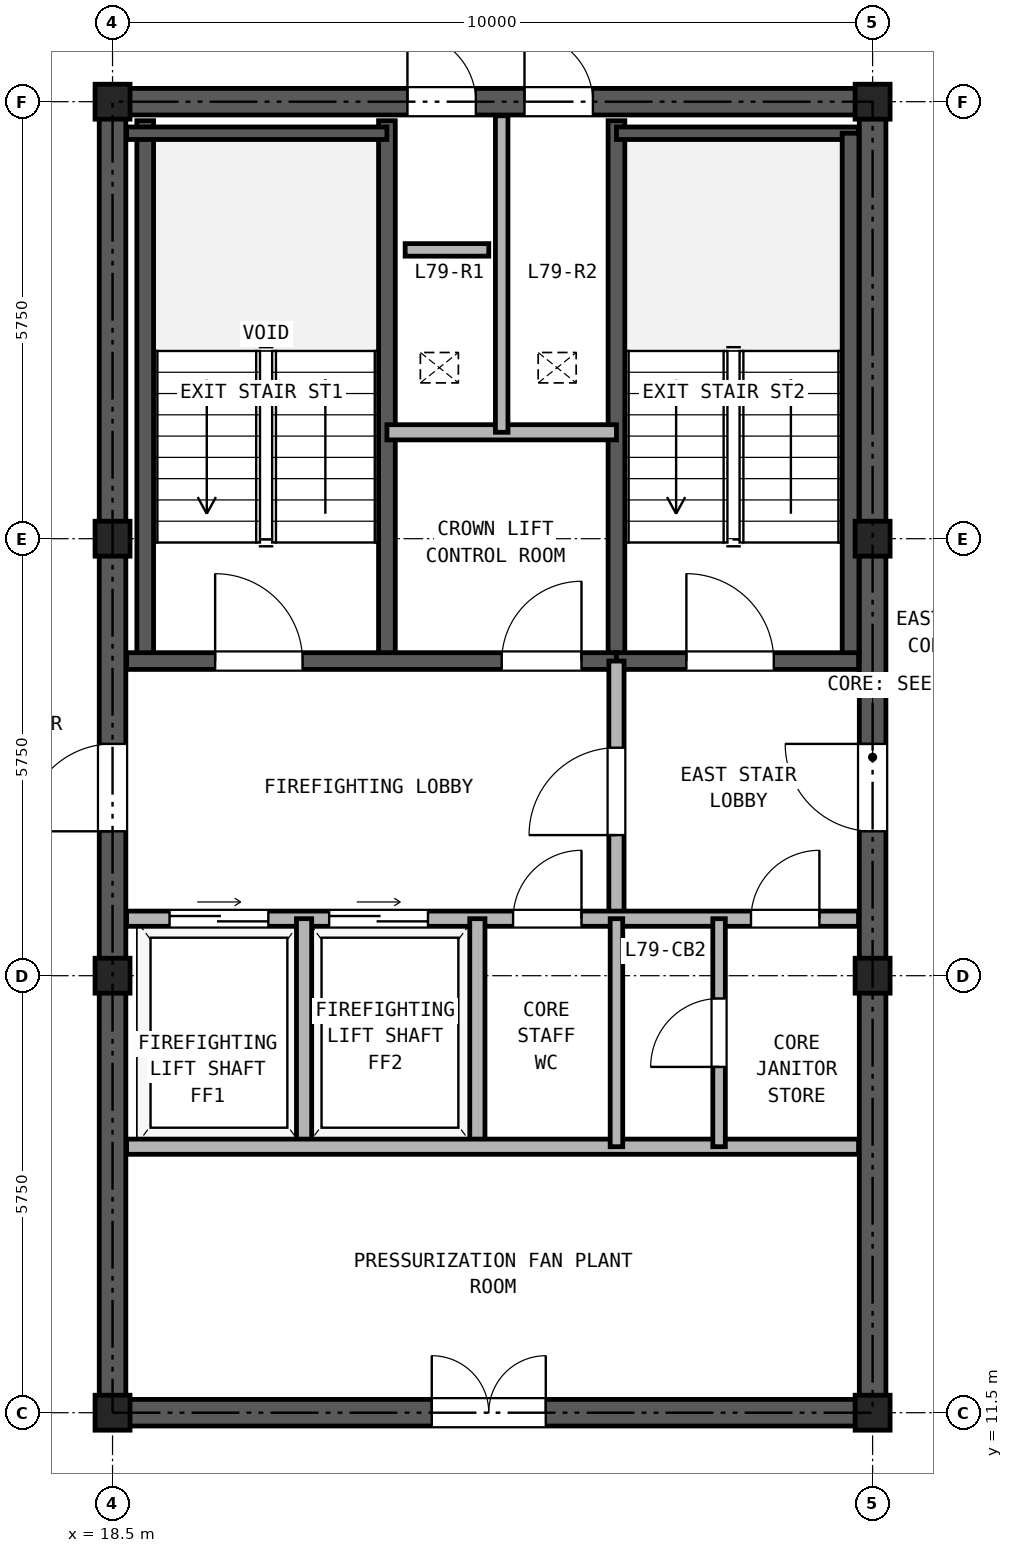
"""IFC4 building model, lengths in metres.
Left out: names, types, materials, properties, quantities, classifications, styles, units other than length and angle.
Written with IfcOpenShell. Run it as: python <this file> out.ifc"""

import sys

from ifc_helpers import new_model, si_unit, direction, frame, frame_2d, origin, origin_2d, place, context, subcontext, project, spatial, rectangle, hollow_rectangle, extrude, source, transform, mapped, element, fill, save


model = new_model("IFC4")
c1 = context("Model", 3, precision=1e-05, world=origin(), true_north=direction((0.0, 1.0)))
c2 = subcontext(c1, "Body", "Model", "MODEL_VIEW")
j1 = project(units=[si_unit("LENGTHUNIT", "METRE"), si_unit("PLANEANGLEUNIT", "RADIAN")], contexts=[c1])
p1 = place(None, origin())
s1 = spatial("IfcSite", under=j1, at=p1, CompositionType="ELEMENT")
p2 = place(p1, origin())
s2 = spatial("IfcBuilding", under=s1, at=p2, CompositionType="ELEMENT")
p3 = place(p2, frame((0.0, 0.0, 274.9)))
s3 = spatial("IfcBuildingStorey", under=s2, at=p3, CompositionType="ELEMENT", Elevation=274.9)
m1 = source(origin(), c2, "Body", "SweptSolid", [
    extrude(hollow_rectangle(XDim=0.46, YDim=0.46, WallThickness=0.025, at=origin_2d()), origin(), (0.0, 0.0, 1.0), 3.38),
])
for number, where, z_axis, x_axis in (
    (1, (18.5, 11.5, 0.0), (0.0, 0.0, 1.0), (1.0, 0.0, 0.0)),
    (2, (18.5, 17.25, 0.0), (0.0, 0.0, 1.0), (1.0, 0.0, 0.0)),
    (3, (18.5, 23.0, 0.0), (0.0, 0.0, 1.0), (1.0, 0.0, 0.0)),
    (4, (18.5, 28.75, 0.0), (0.0, 0.0, 1.0), (1.0, 0.0, 0.0)),
    (5, (28.5, 11.5, 0.0), (0.0, 0.0, 1.0), (1.0, 0.0, 0.0)),
    (6, (28.5, 17.25, 0.0), (0.0, 0.0, 1.0), (1.0, 0.0, 0.0)),
    (7, (28.5, 23.0, 0.0), (0.0, 0.0, 1.0), (1.0, 0.0, 0.0)),
    (8, (28.5, 28.75, 0.0), (0.0, 0.0, 1.0), (1.0, 0.0, 0.0)),
):
    element("IfcColumn", number, at=place(p3, frame(where, z_axis=z_axis, x_axis=x_axis)), inside=s3, PredefinedType="COLUMN", context=c2, shape_type="MappedRepresentation", body=[
        mapped(m1, transform((0.0, 0.0, 0.0), x_axis=(1.0, 0.0, 0.0), y_axis=(0.0, 1.0, 0.0), z_axis=(0.0, 0.0, 1.0), scale=1.0)),
    ])
p4 = place(p3, frame((18.325, 11.5, 0.0), z_axis=(0.0, 0.0, 1.0), x_axis=(1.0, 0.0, 0.0)))
e9 = element("IfcWall", 9, at=p4, inside=s3, PredefinedType="SHEAR", context=c2, shape_type="SweptSolid", body=[
    extrude(rectangle(XDim=10.35, YDim=0.35, at=frame_2d((5.175, 0.0))), origin(), (0.0, 0.0, 1.0), 3.38),
])
p5 = place(p4, frame((4.375, 0.0, 0.0)))
e10 = element("IfcOpeningElement", 10, at=p5, cuts=e9, PredefinedType="OPENING", context=c2, shape_type="SweptSolid", body=[
    extrude(rectangle(XDim=1.5, YDim=2.25, at=frame_2d((0.75, 1.125))), frame((0.0, 0.185, 0.0), z_axis=(0.0, -1.0, 0.0), x_axis=(1.0, 0.0, 0.0)), (0.0, 0.0, 1.0), 0.37),
])
p6 = place(p3, frame((18.325, 28.75, 0.0), z_axis=(0.0, 0.0, 1.0), x_axis=(1.0, 0.0, 0.0)))
e11 = element("IfcWall", 11, at=p6, inside=s3, PredefinedType="SHEAR", context=c2, shape_type="SweptSolid", body=[
    extrude(rectangle(XDim=10.35, YDim=0.35, at=frame_2d((5.175, 0.0))), origin(), (0.0, 0.0, 1.0), 3.38),
])
p7 = place(p6, frame((4.055, 0.0, 0.0)))
e12 = element("IfcOpeningElement", 12, at=p7, cuts=e11, PredefinedType="OPENING", context=c2, shape_type="SweptSolid", body=[
    extrude(rectangle(XDim=0.9, YDim=2.05, at=frame_2d((0.45, 1.025))), frame((0.0, 0.185, 0.0), z_axis=(0.0, -1.0, 0.0), x_axis=(1.0, 0.0, 0.0)), (0.0, 0.0, 1.0), 0.37),
])
p8 = place(p6, frame((5.595, 0.0, 0.0)))
e13 = element("IfcOpeningElement", 13, at=p8, cuts=e11, PredefinedType="OPENING", context=c2, shape_type="SweptSolid", body=[
    extrude(rectangle(XDim=0.9, YDim=2.05, at=frame_2d((0.45, 1.025))), frame((0.0, 0.185, 0.0), z_axis=(0.0, -1.0, 0.0), x_axis=(1.0, 0.0, 0.0)), (0.0, 0.0, 1.0), 0.37),
])
p9 = place(p3, frame((18.5, 11.675, 0.0), z_axis=(0.0, 0.0, 1.0), x_axis=(0.0, 1.0, 0.0)))
e14 = element("IfcWall", 14, at=p9, inside=s3, PredefinedType="SHEAR", context=c2, shape_type="SweptSolid", body=[
    extrude(rectangle(XDim=16.9, YDim=0.35, at=frame_2d((8.45, 0.0))), origin(), (0.0, 0.0, 1.0), 3.38),
])
p10 = place(p9, frame((7.475, 0.0, 0.0)))
e15 = element("IfcOpeningElement", 15, at=p10, cuts=e14, PredefinedType="OPENING", context=c2, shape_type="SweptSolid", body=[
    extrude(rectangle(XDim=1.15, YDim=2.2, at=frame_2d((0.575, 1.1))), frame((0.0, 0.185, 0.0), z_axis=(0.0, -1.0, 0.0), x_axis=(1.0, 0.0, 0.0)), (0.0, 0.0, 1.0), 0.37),
])
p11 = place(p3, frame((28.5, 11.675, 0.0), z_axis=(0.0, 0.0, 1.0), x_axis=(0.0, 1.0, 0.0)))
e16 = element("IfcWall", 16, at=p11, inside=s3, PredefinedType="SHEAR", context=c2, shape_type="SweptSolid", body=[
    extrude(rectangle(XDim=16.9, YDim=0.35, at=frame_2d((8.45, 0.0))), origin(), (0.0, 0.0, 1.0), 3.38),
])
p12 = place(p11, frame((7.475, 0.0, 0.0)))
e17 = element("IfcOpeningElement", 17, at=p12, cuts=e16, PredefinedType="OPENING", context=c2, shape_type="SweptSolid", body=[
    extrude(rectangle(XDim=1.15, YDim=2.2, at=frame_2d((0.575, 1.1))), frame((0.0, 0.185, 0.0), z_axis=(0.0, -1.0, 0.0), x_axis=(1.0, 0.0, 0.0)), (0.0, 0.0, 1.0), 0.37),
])
for number, where, z_axis, x_axis in (
    (18, (18.93, 21.39, 0.0), (0.0, 0.0, 1.0), (0.0, 1.0, 0.0)),
    (19, (22.11, 21.39, 0.0), (0.0, 0.0, 1.0), (0.0, 1.0, 0.0)),
    (20, (25.13, 21.39, 0.0), (0.0, 0.0, 1.0), (0.0, 1.0, 0.0)),
):
    element("IfcWall", number, at=place(p3, frame(where, z_axis=z_axis, x_axis=x_axis)), inside=s3, PredefinedType="SOLIDWALL", context=c2, shape_type="SweptSolid", body=[
        extrude(rectangle(XDim=7.11, YDim=0.22, at=frame_2d((3.555, 0.0))), origin(), (0.0, 0.0, 1.0), 3.38),
    ])
p13 = place(p3, frame((18.685, 28.335, 0.0), z_axis=(0.0, 0.0, 1.0), x_axis=(1.0, 0.0, 0.0)))
e21 = element("IfcWall", 21, at=p13, inside=s3, PredefinedType="PARTITIONING", context=c2, shape_type="SweptSolid", body=[
    extrude(rectangle(XDim=3.425, YDim=0.165, at=frame_2d((1.712, 0.0))), origin(), (0.0, 0.0, 1.0), 3.38),
])
p14 = place(p3, frame((25.13, 28.335, 0.0), z_axis=(0.0, 0.0, 1.0), x_axis=(1.0, 0.0, 0.0)))
e22 = element("IfcWall", 22, at=p14, inside=s3, PredefinedType="PARTITIONING", context=c2, shape_type="SweptSolid", body=[
    extrude(rectangle(XDim=3.185, YDim=0.165, at=frame_2d((1.593, 0.0))), origin(), (0.0, 0.0, 1.0), 3.38),
])
p15 = place(p3, frame((28.21, 21.39, 0.0), z_axis=(0.0, 0.0, 1.0), x_axis=(0.0, 1.0, 0.0)))
e23 = element("IfcWall", 23, at=p15, inside=s3, PredefinedType="SOLIDWALL", context=c2, shape_type="SweptSolid", body=[
    extrude(rectangle(XDim=6.945, YDim=0.22, at=frame_2d((3.473, 0.0))), origin(), (0.0, 0.0, 1.0), 3.38),
])
p16 = place(p3, frame((18.685, 21.39, 0.0), z_axis=(0.0, 0.0, 1.0), x_axis=(1.0, 0.0, 0.0)))
e24 = element("IfcWall", 24, at=p16, inside=s3, PredefinedType="SOLIDWALL", context=c2, shape_type="SweptSolid", body=[
    extrude(rectangle(XDim=6.445, YDim=0.22, at=frame_2d((3.222, 0.0))), origin(), (0.0, 0.0, 1.0), 3.38),
])
p17 = place(p16, frame((1.165, 0.0, 0.0)))
e25 = element("IfcOpeningElement", 25, at=p17, cuts=e24, PredefinedType="OPENING", context=c2, shape_type="SweptSolid", body=[
    extrude(rectangle(XDim=1.15, YDim=2.2, at=frame_2d((0.575, 1.1))), frame((0.0, 0.12, 0.0), z_axis=(0.0, -1.0, 0.0), x_axis=(1.0, 0.0, 0.0)), (0.0, 0.0, 1.0), 0.24),
])
p18 = place(p16, frame((4.935, 0.0, 0.0)))
e26 = element("IfcOpeningElement", 26, at=p18, cuts=e24, PredefinedType="OPENING", context=c2, shape_type="SweptSolid", body=[
    extrude(rectangle(XDim=1.05, YDim=2.15, at=frame_2d((0.525, 1.075))), frame((0.0, 0.12, 0.0), z_axis=(0.0, -1.0, 0.0), x_axis=(1.0, 0.0, 0.0)), (0.0, 0.0, 1.0), 0.24),
])
p19 = place(p3, frame((25.13, 21.39, 0.0), z_axis=(0.0, 0.0, 1.0), x_axis=(1.0, 0.0, 0.0)))
e27 = element("IfcWall", 27, at=p19, inside=s3, PredefinedType="SOLIDWALL", context=c2, shape_type="SweptSolid", body=[
    extrude(rectangle(XDim=3.185, YDim=0.22, at=frame_2d((1.593, 0.0))), origin(), (0.0, 0.0, 1.0), 3.38),
])
p20 = place(p19, frame((0.92, 0.0, 0.0)))
e28 = element("IfcOpeningElement", 28, at=p20, cuts=e27, PredefinedType="OPENING", context=c2, shape_type="SweptSolid", body=[
    extrude(rectangle(XDim=1.15, YDim=2.2, at=frame_2d((0.575, 1.1))), frame((0.0, 0.12, 0.0), z_axis=(0.0, -1.0, 0.0), x_axis=(1.0, 0.0, 0.0)), (0.0, 0.0, 1.0), 0.24),
])
p21 = place(p3, frame((22.11, 24.4, 0.0), z_axis=(0.0, 0.0, 1.0), x_axis=(1.0, 0.0, 0.0)))
e29 = element("IfcWall", 29, at=p21, inside=s3, PredefinedType="PARTITIONING", context=c2, shape_type="SweptSolid", body=[
    extrude(rectangle(XDim=3.02, YDim=0.2, at=frame_2d((1.51, 0.0))), origin(), (0.0, 0.0, 1.0), 3.38),
])
p22 = place(p3, frame((23.62, 24.4, 0.0), z_axis=(0.0, 0.0, 1.0), x_axis=(0.0, 1.0, 0.0)))
e30 = element("IfcWall", 30, at=p22, inside=s3, PredefinedType="PARTITIONING", context=c2, shape_type="SweptSolid", body=[
    extrude(rectangle(XDim=4.165, YDim=0.165, at=frame_2d((2.083, 0.0))), origin(), (0.0, 0.0, 1.0), 3.38),
])
p23 = place(p3, frame((25.13, 18.0, 0.0), z_axis=(0.0, 0.0, 1.0), x_axis=(0.0, 1.0, 0.0)))
e31 = element("IfcWall", 31, at=p23, inside=s3, PredefinedType="PARTITIONING", context=c2, shape_type="SweptSolid", body=[
    extrude(rectangle(XDim=3.39, YDim=0.2, at=frame_2d((1.695, 0.0))), origin(), (0.0, 0.0, 1.0), 3.38),
])
p24 = place(p23, frame((1.1, 0.0, 0.0)))
e32 = element("IfcOpeningElement", 32, at=p24, cuts=e31, PredefinedType="OPENING", context=c2, shape_type="SweptSolid", body=[
    extrude(rectangle(XDim=1.15, YDim=2.2, at=frame_2d((0.575, 1.1))), frame((0.0, 0.11, 0.0), z_axis=(0.0, -1.0, 0.0), x_axis=(1.0, 0.0, 0.0)), (0.0, 0.0, 1.0), 0.22),
])
p25 = place(p3, frame((18.685, 18.0, 0.0), z_axis=(0.0, 0.0, 1.0), x_axis=(1.0, 0.0, 0.0)))
e33 = element("IfcWall", 33, at=p25, inside=s3, PredefinedType="PARTITIONING", context=c2, shape_type="SweptSolid", body=[
    extrude(rectangle(XDim=9.63, YDim=0.2, at=frame_2d((4.815, 0.0))), origin(), (0.0, 0.0, 1.0), 3.38),
])
p26 = place(p25, frame((0.565, 0.0, 0.0)))
e34 = element("IfcOpeningElement", 34, at=p26, cuts=e33, PredefinedType="OPENING", context=c2, shape_type="SweptSolid", body=[
    extrude(rectangle(XDim=1.3, YDim=2.3, at=frame_2d((0.65, 1.15))), frame((0.0, 0.11, 0.0), z_axis=(0.0, -1.0, 0.0), x_axis=(1.0, 0.0, 0.0)), (0.0, 0.0, 1.0), 0.22),
])
p27 = place(p25, frame((2.665, 0.0, 0.0)))
e35 = element("IfcOpeningElement", 35, at=p27, cuts=e33, PredefinedType="OPENING", context=c2, shape_type="SweptSolid", body=[
    extrude(rectangle(XDim=1.3, YDim=2.3, at=frame_2d((0.65, 1.15))), frame((0.0, 0.11, 0.0), z_axis=(0.0, -1.0, 0.0), x_axis=(1.0, 0.0, 0.0)), (0.0, 0.0, 1.0), 0.22),
])
p28 = place(p25, frame((5.085, 0.0, 0.0)))
e36 = element("IfcOpeningElement", 36, at=p28, cuts=e33, PredefinedType="OPENING", context=c2, shape_type="SweptSolid", body=[
    extrude(rectangle(XDim=0.9, YDim=2.05, at=frame_2d((0.45, 1.025))), frame((0.0, 0.11, 0.0), z_axis=(0.0, -1.0, 0.0), x_axis=(1.0, 0.0, 0.0)), (0.0, 0.0, 1.0), 0.22),
])
p29 = place(p25, frame((8.215, 0.0, 0.0)))
e37 = element("IfcOpeningElement", 37, at=p29, cuts=e33, PredefinedType="OPENING", context=c2, shape_type="SweptSolid", body=[
    extrude(rectangle(XDim=0.9, YDim=2.05, at=frame_2d((0.45, 1.025))), frame((0.0, 0.11, 0.0), z_axis=(0.0, -1.0, 0.0), x_axis=(1.0, 0.0, 0.0)), (0.0, 0.0, 1.0), 0.22),
])
for number, where, z_axis, x_axis in (
    (38, (21.02, 15.0, 0.0), (0.0, 0.0, 1.0), (0.0, 1.0, 0.0)),
    (39, (23.3, 15.0, 0.0), (0.0, 0.0, 1.0), (0.0, 1.0, 0.0)),
):
    element("IfcWall", number, at=place(p3, frame(where, z_axis=z_axis, x_axis=x_axis)), inside=s3, PredefinedType="PARTITIONING", context=c2, shape_type="SweptSolid", body=[
        extrude(rectangle(XDim=3.0, YDim=0.2, at=frame_2d((1.5, 0.0))), origin(), (0.0, 0.0, 1.0), 3.38),
    ])
p30 = place(p3, frame((18.685, 15.0, 0.0), z_axis=(0.0, 0.0, 1.0), x_axis=(1.0, 0.0, 0.0)))
e40 = element("IfcWall", 40, at=p30, inside=s3, PredefinedType="PARTITIONING", context=c2, shape_type="SweptSolid", body=[
    extrude(rectangle(XDim=9.63, YDim=0.2, at=frame_2d((4.815, 0.0))), origin(), (0.0, 0.0, 1.0), 3.38),
])
p31 = place(p3, frame((25.13, 15.0, 0.0), z_axis=(0.0, 0.0, 1.0), x_axis=(0.0, 1.0, 0.0)))
e41 = element("IfcWall", 41, at=p31, inside=s3, PredefinedType="PARTITIONING", context=c2, shape_type="SweptSolid", body=[
    extrude(rectangle(XDim=3.0, YDim=0.165, at=frame_2d((1.5, 0.0))), origin(), (0.0, 0.0, 1.0), 3.38),
])
p32 = place(p3, frame((26.48, 15.0, 0.0), z_axis=(0.0, 0.0, 1.0), x_axis=(0.0, 1.0, 0.0)))
e42 = element("IfcWall", 42, at=p32, inside=s3, PredefinedType="PARTITIONING", context=c2, shape_type="SweptSolid", body=[
    extrude(rectangle(XDim=3.0, YDim=0.165, at=frame_2d((1.5, 0.0))), origin(), (0.0, 0.0, 1.0), 3.38),
])
p33 = place(p32, frame((1.05, 0.0, 0.0)))
e43 = element("IfcOpeningElement", 43, at=p33, cuts=e42, PredefinedType="OPENING", context=c2, shape_type="SweptSolid", body=[
    extrude(rectangle(XDim=0.9, YDim=2.05, at=frame_2d((0.45, 1.025))), frame((0.0, 0.093, 0.0), z_axis=(0.0, -1.0, 0.0), x_axis=(1.0, 0.0, 0.0)), (0.0, 0.0, 1.0), 0.185),
])
p34 = place(p3, frame((22.35, 26.8, 0.0), z_axis=(0.0, 0.0, 1.0), x_axis=(1.0, 0.0, 0.0)))
e44 = element("IfcWall", 44, at=p34, inside=s3, PredefinedType="PARTITIONING", context=c2, shape_type="SweptSolid", body=[
    extrude(rectangle(XDim=1.1, YDim=0.165, at=frame_2d((0.55, 0.0))), origin(), (0.0, 0.0, 1.0), 3.38),
])
p35 = place(p17, frame((1.15, 0.0, 0.0), z_axis=(0.0, 0.0, 1.0), x_axis=(-1.0, 0.0, 0.0)))
e45 = element("IfcDoor", 45, at=p35, inside=s3, OperationType="SINGLE_SWING_LEFT", PredefinedType="DOOR", context=c2, shape_type="SweptSolid", body=[
    extrude(rectangle(XDim=1.15, YDim=2.2, at=frame_2d((0.575, 1.1))), frame((0.0, 0.025, 0.0), z_axis=(0.0, -1.0, 0.0), x_axis=(1.0, 0.0, 0.0)), (0.0, 0.0, 1.0), 0.05),
])
fill(e25, e45)
p36 = place(p20, frame((1.15, 0.0, 0.0), z_axis=(0.0, 0.0, 1.0), x_axis=(-1.0, 0.0, 0.0)))
e46 = element("IfcDoor", 46, at=p36, inside=s3, OperationType="SINGLE_SWING_LEFT", PredefinedType="DOOR", context=c2, shape_type="SweptSolid", body=[
    extrude(rectangle(XDim=1.15, YDim=2.2, at=frame_2d((0.575, 1.1))), frame((0.0, 0.025, 0.0), z_axis=(0.0, -1.0, 0.0), x_axis=(1.0, 0.0, 0.0)), (0.0, 0.0, 1.0), 0.05),
])
fill(e28, e46)
p37 = place(p18, origin())
e47 = element("IfcDoor", 47, at=p37, inside=s3, OperationType="SINGLE_SWING_RIGHT", PredefinedType="DOOR", context=c2, shape_type="SweptSolid", body=[
    extrude(rectangle(XDim=1.05, YDim=2.15, at=frame_2d((0.525, 1.075))), frame((0.0, 0.025, 0.0), z_axis=(0.0, -1.0, 0.0), x_axis=(1.0, 0.0, 0.0)), (0.0, 0.0, 1.0), 0.05),
])
fill(e26, e47)
p38 = place(p24, origin())
e48 = element("IfcDoor", 48, at=p38, inside=s3, OperationType="SINGLE_SWING_LEFT", PredefinedType="DOOR", context=c2, shape_type="SweptSolid", body=[
    extrude(rectangle(XDim=1.15, YDim=2.2, at=frame_2d((0.575, 1.1))), frame((0.0, 0.025, 0.0), z_axis=(0.0, -1.0, 0.0), x_axis=(1.0, 0.0, 0.0)), (0.0, 0.0, 1.0), 0.05),
])
fill(e32, e48)
p39 = place(p26, origin())
e49 = element("IfcDoor", 49, at=p39, inside=s3, OperationType="DOUBLE_DOOR_SLIDING", PredefinedType="DOOR", context=c2, shape_type="SweptSolid", body=[
    extrude(rectangle(XDim=1.3, YDim=2.3, at=frame_2d((0.65, 1.15))), frame((0.0, 0.025, 0.0), z_axis=(0.0, -1.0, 0.0), x_axis=(1.0, 0.0, 0.0)), (0.0, 0.0, 1.0), 0.05),
])
fill(e34, e49)
p40 = place(p27, origin())
e50 = element("IfcDoor", 50, at=p40, inside=s3, OperationType="DOUBLE_DOOR_SLIDING", PredefinedType="DOOR", context=c2, shape_type="SweptSolid", body=[
    extrude(rectangle(XDim=1.3, YDim=2.3, at=frame_2d((0.65, 1.15))), frame((0.0, 0.025, 0.0), z_axis=(0.0, -1.0, 0.0), x_axis=(1.0, 0.0, 0.0)), (0.0, 0.0, 1.0), 0.05),
])
fill(e35, e50)
p41 = place(p28, frame((0.9, 0.0, 0.0), z_axis=(0.0, 0.0, 1.0), x_axis=(-1.0, 0.0, 0.0)))
e51 = element("IfcDoor", 51, at=p41, inside=s3, OperationType="SINGLE_SWING_RIGHT", PredefinedType="DOOR", context=c2, shape_type="SweptSolid", body=[
    extrude(rectangle(XDim=0.9, YDim=2.05, at=frame_2d((0.45, 1.025))), frame((0.0, 0.025, 0.0), z_axis=(0.0, -1.0, 0.0), x_axis=(1.0, 0.0, 0.0)), (0.0, 0.0, 1.0), 0.05),
])
fill(e36, e51)
p42 = place(p33, origin())
e52 = element("IfcDoor", 52, at=p42, inside=s3, OperationType="SINGLE_SWING_LEFT", PredefinedType="DOOR", context=c2, shape_type="SweptSolid", body=[
    extrude(rectangle(XDim=0.9, YDim=2.05, at=frame_2d((0.45, 1.025))), frame((0.0, 0.025, 0.0), z_axis=(0.0, -1.0, 0.0), x_axis=(1.0, 0.0, 0.0)), (0.0, 0.0, 1.0), 0.05),
])
fill(e43, e52)
p43 = place(p29, frame((0.9, 0.0, 0.0), z_axis=(0.0, 0.0, 1.0), x_axis=(-1.0, 0.0, 0.0)))
e53 = element("IfcDoor", 53, at=p43, inside=s3, OperationType="SINGLE_SWING_RIGHT", PredefinedType="DOOR", context=c2, shape_type="SweptSolid", body=[
    extrude(rectangle(XDim=0.9, YDim=2.05, at=frame_2d((0.45, 1.025))), frame((0.0, 0.025, 0.0), z_axis=(0.0, -1.0, 0.0), x_axis=(1.0, 0.0, 0.0)), (0.0, 0.0, 1.0), 0.05),
])
fill(e37, e53)
p44 = place(p10, frame((1.15, 0.0, 0.0), z_axis=(0.0, 0.0, 1.0), x_axis=(-1.0, 0.0, 0.0)))
e54 = element("IfcDoor", 54, at=p44, inside=s3, OperationType="SINGLE_SWING_LEFT", PredefinedType="DOOR", context=c2, shape_type="SweptSolid", body=[
    extrude(rectangle(XDim=1.15, YDim=2.2, at=frame_2d((0.575, 1.1))), frame((0.0, 0.025, 0.0), z_axis=(0.0, -1.0, 0.0), x_axis=(1.0, 0.0, 0.0)), (0.0, 0.0, 1.0), 0.05),
])
fill(e15, e54)
p45 = place(p12, origin())
e55 = element("IfcDoor", 55, at=p45, inside=s3, OperationType="SINGLE_SWING_RIGHT", PredefinedType="DOOR", context=c2, shape_type="SweptSolid", body=[
    extrude(rectangle(XDim=1.15, YDim=2.2, at=frame_2d((0.575, 1.1))), frame((0.0, 0.025, 0.0), z_axis=(0.0, -1.0, 0.0), x_axis=(1.0, 0.0, 0.0)), (0.0, 0.0, 1.0), 0.05),
])
fill(e17, e55)
p46 = place(p7, origin())
e56 = element("IfcDoor", 56, at=p46, inside=s3, OperationType="SINGLE_SWING_LEFT", PredefinedType="DOOR", context=c2, shape_type="SweptSolid", body=[
    extrude(rectangle(XDim=0.9, YDim=2.05, at=frame_2d((0.45, 1.025))), frame((0.0, 0.025, 0.0), z_axis=(0.0, -1.0, 0.0), x_axis=(1.0, 0.0, 0.0)), (0.0, 0.0, 1.0), 0.05),
])
fill(e12, e56)
p47 = place(p8, origin())
e57 = element("IfcDoor", 57, at=p47, inside=s3, OperationType="SINGLE_SWING_LEFT", PredefinedType="DOOR", context=c2, shape_type="SweptSolid", body=[
    extrude(rectangle(XDim=0.9, YDim=2.05, at=frame_2d((0.45, 1.025))), frame((0.0, 0.025, 0.0), z_axis=(0.0, -1.0, 0.0), x_axis=(1.0, 0.0, 0.0)), (0.0, 0.0, 1.0), 0.05),
])
fill(e13, e57)
p48 = place(p5, frame((1.5, 0.0, 0.0), z_axis=(0.0, 0.0, 1.0), x_axis=(-1.0, 0.0, 0.0)))
e58 = element("IfcDoor", 58, at=p48, inside=s3, OperationType="DOUBLE_DOOR_SINGLE_SWING", PredefinedType="DOOR", context=c2, shape_type="SweptSolid", body=[
    extrude(rectangle(XDim=1.5, YDim=2.25, at=frame_2d((0.75, 1.125))), frame((0.0, 0.025, 0.0), z_axis=(0.0, -1.0, 0.0), x_axis=(1.0, 0.0, 0.0)), (0.0, 0.0, 1.0), 0.05),
])
fill(e10, e58)
save(model, sys.argv[1])
